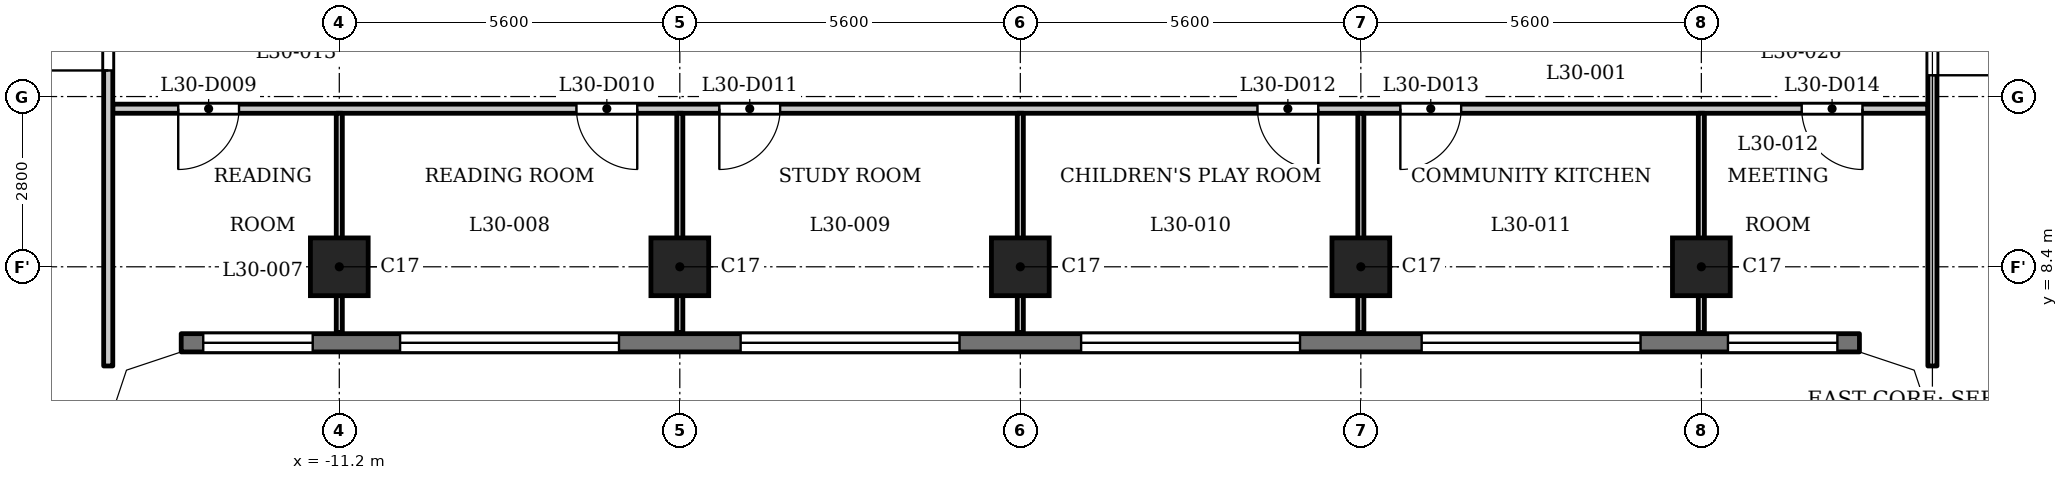
"""IFC4 building model, lengths in metres.
Left out: names, types, materials, properties, quantities, classifications, styles, units other than length and angle.
Written with IfcOpenShell. Run it as: python <this file> out.ifc"""

import sys

from ifc_helpers import new_model, si_unit, direction, frame, frame_2d, origin, origin_2d, place, context, subcontext, project, spatial, polyline, rectangle, outline, extrude, element, fill, save


model = new_model("IFC4")
c1 = context("Model", 3, precision=1e-05, world=origin(), true_north=direction((0.0, 1.0)))
c2 = subcontext(c1, "Body", "Model", "MODEL_VIEW")
j1 = project(units=[si_unit("LENGTHUNIT", "METRE"), si_unit("PLANEANGLEUNIT", "RADIAN")], contexts=[c1])
p1 = place(None, origin())
s1 = spatial("IfcSite", under=j1, at=p1, CompositionType="ELEMENT")
p2 = place(p1, origin())
s2 = spatial("IfcBuilding", under=s1, at=p2, CompositionType="ELEMENT")
p3 = place(p2, frame((0.0, 0.0, 118.3)))
s3 = spatial("IfcBuildingStorey", under=s2, at=p3, CompositionType="ELEMENT", Elevation=118.3)
for number, where, z_axis, x_axis in (
    (1, (-11.2, 8.4, 0.0), (0.0, 0.0, 1.0), (1.0, 0.0, 0.0)),
    (2, (-5.6, 8.4, 0.0), (0.0, 0.0, 1.0), (1.0, 0.0, 0.0)),
    (3, (0.0, 8.4, 0.0), (0.0, 0.0, 1.0), (1.0, 0.0, 0.0)),
    (4, (5.6, 8.4, 0.0), (0.0, 0.0, 1.0), (1.0, 0.0, 0.0)),
    (5, (11.2, 8.4, 0.0), (0.0, 0.0, 1.0), (1.0, 0.0, 0.0)),
):
    element("IfcColumn", number, at=place(p3, frame(where, z_axis=z_axis, x_axis=x_axis)), inside=s3, PredefinedType="COLUMN", context=c2, shape_type="SweptSolid", body=[
        extrude(rectangle(XDim=0.95, YDim=0.95, at=origin_2d()), origin(), (0.0, 0.0, 1.0), 3.5),
    ])
p4 = place(p3, frame((-13.8, 7.15, 0.0), z_axis=(0.0, 0.0, 1.0), x_axis=(1.0, 0.0, 0.0)))
e6 = element("IfcWall", 6, at=p4, inside=s3, PredefinedType="SOLIDWALL", context=c2, shape_type="SweptSolid", body=[
    extrude(rectangle(XDim=27.6, YDim=0.3, at=frame_2d((13.8, 0.0))), origin(), (0.0, 0.0, 1.0), 3.2),
])
p5 = place(p4, frame((0.363, 0.0, 0.9)))
e7 = element("IfcOpeningElement", 7, at=p5, cuts=e6, PredefinedType="OPENING", context=c2, shape_type="SweptSolid", body=[
    extrude(rectangle(XDim=1.8, YDim=1.25, at=frame_2d((0.9, 0.625))), frame((0.0, 0.16, 0.0), z_axis=(0.0, -1.0, 0.0), x_axis=(1.0, 0.0, 0.0)), (0.0, 0.0, 1.0), 0.32),
])
p6 = place(p4, frame((3.6, 0.0, 1.2)))
e8 = element("IfcOpeningElement", 8, at=p6, cuts=e6, PredefinedType="OPENING", context=c2, shape_type="SweptSolid", body=[
    extrude(rectangle(XDim=3.6, YDim=0.95, at=frame_2d((1.8, 0.475))), frame((0.0, 0.16, 0.0), z_axis=(0.0, -1.0, 0.0), x_axis=(1.0, 0.0, 0.0)), (0.0, 0.0, 1.0), 0.32),
])
p7 = place(p4, frame((9.2, 0.0, 1.2)))
e9 = element("IfcOpeningElement", 9, at=p7, cuts=e6, PredefinedType="OPENING", context=c2, shape_type="SweptSolid", body=[
    extrude(rectangle(XDim=3.6, YDim=0.95, at=frame_2d((1.8, 0.475))), frame((0.0, 0.16, 0.0), z_axis=(0.0, -1.0, 0.0), x_axis=(1.0, 0.0, 0.0)), (0.0, 0.0, 1.0), 0.32),
])
p8 = place(p4, frame((14.8, 0.0, 1.2)))
e10 = element("IfcOpeningElement", 10, at=p8, cuts=e6, PredefinedType="OPENING", context=c2, shape_type="SweptSolid", body=[
    extrude(rectangle(XDim=3.6, YDim=0.95, at=frame_2d((1.8, 0.475))), frame((0.0, 0.16, 0.0), z_axis=(0.0, -1.0, 0.0), x_axis=(1.0, 0.0, 0.0)), (0.0, 0.0, 1.0), 0.32),
])
p9 = place(p4, frame((20.4, 0.0, 1.2)))
e11 = element("IfcOpeningElement", 11, at=p9, cuts=e6, PredefinedType="OPENING", context=c2, shape_type="SweptSolid", body=[
    extrude(rectangle(XDim=3.6, YDim=0.95, at=frame_2d((1.8, 0.475))), frame((0.0, 0.16, 0.0), z_axis=(0.0, -1.0, 0.0), x_axis=(1.0, 0.0, 0.0)), (0.0, 0.0, 1.0), 0.32),
])
p10 = place(p4, frame((25.438, 0.0, 0.9)))
e12 = element("IfcOpeningElement", 12, at=p10, cuts=e6, PredefinedType="OPENING", context=c2, shape_type="SweptSolid", body=[
    extrude(rectangle(XDim=1.8, YDim=1.25, at=frame_2d((0.9, 0.625))), frame((0.0, 0.16, 0.0), z_axis=(0.0, -1.0, 0.0), x_axis=(1.0, 0.0, 0.0)), (0.0, 0.0, 1.0), 0.32),
])
p11 = place(p3, frame((-14.925, 11.0, 0.0), z_axis=(0.0, 0.0, 1.0), x_axis=(1.0, 0.0, 0.0)))
e13 = element("IfcWall", 13, at=p11, inside=s3, PredefinedType="PARTITIONING", context=c2, shape_type="SweptSolid", body=[
    extrude(rectangle(XDim=29.85, YDim=0.15, at=frame_2d((14.925, 0.0))), origin(), (0.0, 0.0, 1.0), 3.2),
])
p12 = place(p11, frame((1.076, 0.0, 0.0)))
e14 = element("IfcOpeningElement", 14, at=p12, cuts=e13, PredefinedType="OPENING", context=c2, shape_type="SweptSolid", body=[
    extrude(rectangle(XDim=1.0, YDim=2.1, at=frame_2d((0.5, 1.05))), frame((0.0, 0.085, 0.0), z_axis=(0.0, -1.0, 0.0), x_axis=(1.0, 0.0, 0.0)), (0.0, 0.0, 1.0), 0.17),
])
p13 = place(p11, frame((7.625, 0.0, 0.0)))
e15 = element("IfcOpeningElement", 15, at=p13, cuts=e13, PredefinedType="OPENING", context=c2, shape_type="SweptSolid", body=[
    extrude(rectangle(XDim=1.0, YDim=2.1, at=frame_2d((0.5, 1.05))), frame((0.0, 0.085, 0.0), z_axis=(0.0, -1.0, 0.0), x_axis=(1.0, 0.0, 0.0)), (0.0, 0.0, 1.0), 0.17),
])
p14 = place(p11, frame((9.975, 0.0, 0.0)))
e16 = element("IfcOpeningElement", 16, at=p14, cuts=e13, PredefinedType="OPENING", context=c2, shape_type="SweptSolid", body=[
    extrude(rectangle(XDim=1.0, YDim=2.1, at=frame_2d((0.5, 1.05))), frame((0.0, 0.085, 0.0), z_axis=(0.0, -1.0, 0.0), x_axis=(1.0, 0.0, 0.0)), (0.0, 0.0, 1.0), 0.17),
])
p15 = place(p11, frame((18.825, 0.0, 0.0)))
e17 = element("IfcOpeningElement", 17, at=p15, cuts=e13, PredefinedType="OPENING", context=c2, shape_type="SweptSolid", body=[
    extrude(rectangle(XDim=1.0, YDim=2.1, at=frame_2d((0.5, 1.05))), frame((0.0, 0.085, 0.0), z_axis=(0.0, -1.0, 0.0), x_axis=(1.0, 0.0, 0.0)), (0.0, 0.0, 1.0), 0.17),
])
p16 = place(p11, frame((21.175, 0.0, 0.0)))
e18 = element("IfcOpeningElement", 18, at=p16, cuts=e13, PredefinedType="OPENING", context=c2, shape_type="SweptSolid", body=[
    extrude(rectangle(XDim=1.0, YDim=2.1, at=frame_2d((0.5, 1.05))), frame((0.0, 0.085, 0.0), z_axis=(0.0, -1.0, 0.0), x_axis=(1.0, 0.0, 0.0)), (0.0, 0.0, 1.0), 0.17),
])
p17 = place(p11, frame((27.775, 0.0, 0.0)))
e19 = element("IfcOpeningElement", 19, at=p17, cuts=e13, PredefinedType="OPENING", context=c2, shape_type="SweptSolid", body=[
    extrude(rectangle(XDim=1.0, YDim=2.1, at=frame_2d((0.5, 1.05))), frame((0.0, 0.085, 0.0), z_axis=(0.0, -1.0, 0.0), x_axis=(1.0, 0.0, 0.0)), (0.0, 0.0, 1.0), 0.17),
])
p18 = place(p3, frame((-15.0, 6.769, 0.0), z_axis=(0.0, 0.0, 1.0), x_axis=(0.0, 1.0, 0.0)))
e20 = element("IfcWall", 20, at=p18, inside=s3, PredefinedType="PARTITIONING", context=c2, shape_type="SweptSolid", body=[
    extrude(rectangle(XDim=6.356, YDim=0.15, at=frame_2d((3.178, 0.0))), origin(), (0.0, 0.0, 1.0), 3.2),
])
p19 = place(p18, frame((4.86, 0.0, 0.0)))
e21 = element("IfcOpeningElement", 21, at=p19, cuts=e20, PredefinedType="OPENING", context=c2, shape_type="SweptSolid", body=[
    extrude(rectangle(XDim=1.0, YDim=2.1, at=frame_2d((0.5, 1.05))), frame((0.0, 0.085, 0.0), z_axis=(0.0, -1.0, 0.0), x_axis=(1.0, 0.0, 0.0)), (0.0, 0.0, 1.0), 0.17),
])
for number, where, z_axis, x_axis in (
    (22, (-11.2, 7.32, 0.0), (0.0, 0.0, 1.0), (0.0, 1.0, 0.0)),
    (23, (-5.6, 7.32, 0.0), (0.0, 0.0, 1.0), (0.0, 1.0, 0.0)),
    (24, (0.0, 7.32, 0.0), (0.0, 0.0, 1.0), (0.0, 1.0, 0.0)),
    (25, (5.6, 7.32, 0.0), (0.0, 0.0, 1.0), (0.0, 1.0, 0.0)),
    (26, (11.2, 7.32, 0.0), (0.0, 0.0, 1.0), (0.0, 1.0, 0.0)),
):
    element("IfcWall", number, at=place(p3, frame(where, z_axis=z_axis, x_axis=x_axis)), inside=s3, PredefinedType="PARTITIONING", context=c2, shape_type="SweptSolid", body=[
        extrude(rectangle(XDim=3.605, YDim=0.1, at=frame_2d((1.802, 0.0))), origin(), (0.0, 0.0, 1.0), 3.2),
    ])
p20 = place(p3, frame((15.0, 6.769, 0.0), z_axis=(0.0, 0.0, 1.0), x_axis=(0.0, 1.0, 0.0)))
e27 = element("IfcWall", 27, at=p20, inside=s3, PredefinedType="PARTITIONING", context=c2, shape_type="SweptSolid", body=[
    extrude(rectangle(XDim=6.356, YDim=0.15, at=frame_2d((3.178, 0.0))), origin(), (0.0, 0.0, 1.0), 3.2),
])
p21 = place(p20, frame((4.781, 0.0, 0.0)))
e28 = element("IfcOpeningElement", 28, at=p21, cuts=e27, PredefinedType="OPENING", context=c2, shape_type="SweptSolid", body=[
    extrude(rectangle(XDim=1.0, YDim=2.1, at=frame_2d((0.5, 1.05))), frame((0.0, 0.085, 0.0), z_axis=(0.0, -1.0, 0.0), x_axis=(1.0, 0.0, 0.0)), (0.0, 0.0, 1.0), 0.17),
])
p22 = place(p3, origin())
e29 = element("IfcWall", 29, at=p22, inside=s3, PredefinedType="SOLIDWALL", context=c2, shape_type="SweptSolid", body=[
    extrude(outline(polyline([(-13.849, 7.3), (-14.937, 6.937), (-15.3, 5.849), (-15.3, 5.8), (-15.0, 5.8), (-14.7, 6.7), (-13.8, 7.0), (-13.8, 7.3), (-13.849, 7.3)])), origin(), (0.0, 0.0, 1.0), 3.2),
])
e30 = element("IfcWall", 30, at=p22, inside=s3, PredefinedType="SOLIDWALL", context=c2, shape_type="SweptSolid", body=[
    extrude(outline(polyline([(14.937, 6.937), (13.849, 7.3), (13.8, 7.3), (13.8, 7.0), (14.7, 6.7), (15.0, 5.8), (15.3, 5.8), (15.3, 5.849), (14.937, 6.937)])), origin(), (0.0, 0.0, 1.0), 3.2),
])
p23 = place(p19, origin())
e31 = element("IfcDoor", 31, at=p23, inside=s3, OperationType="SINGLE_SWING_RIGHT", PredefinedType="DOOR", context=c2, shape_type="SweptSolid", body=[
    extrude(rectangle(XDim=1.0, YDim=2.1, at=frame_2d((0.5, 1.05))), frame((0.0, 0.025, 0.0), z_axis=(0.0, -1.0, 0.0), x_axis=(1.0, 0.0, 0.0)), (0.0, 0.0, 1.0), 0.05),
])
fill(e21, e31)
p24 = place(p21, origin())
e32 = element("IfcDoor", 32, at=p24, inside=s3, OperationType="SINGLE_SWING_LEFT", PredefinedType="DOOR", context=c2, shape_type="SweptSolid", body=[
    extrude(rectangle(XDim=1.0, YDim=2.1, at=frame_2d((0.5, 1.05))), frame((0.0, 0.025, 0.0), z_axis=(0.0, -1.0, 0.0), x_axis=(1.0, 0.0, 0.0)), (0.0, 0.0, 1.0), 0.05),
])
fill(e28, e32)
p25 = place(p12, origin())
e33 = element("IfcDoor", 33, at=p25, inside=s3, OperationType="SINGLE_SWING_LEFT", PredefinedType="DOOR", context=c2, shape_type="SweptSolid", body=[
    extrude(rectangle(XDim=1.0, YDim=2.1, at=frame_2d((0.5, 1.05))), frame((0.0, 0.025, 0.0), z_axis=(0.0, -1.0, 0.0), x_axis=(1.0, 0.0, 0.0)), (0.0, 0.0, 1.0), 0.05),
])
fill(e14, e33)
p26 = place(p13, origin())
e34 = element("IfcDoor", 34, at=p26, inside=s3, OperationType="SINGLE_SWING_RIGHT", PredefinedType="DOOR", context=c2, shape_type="SweptSolid", body=[
    extrude(rectangle(XDim=1.0, YDim=2.1, at=frame_2d((0.5, 1.05))), frame((0.0, 0.025, 0.0), z_axis=(0.0, -1.0, 0.0), x_axis=(1.0, 0.0, 0.0)), (0.0, 0.0, 1.0), 0.05),
])
fill(e15, e34)
p27 = place(p14, origin())
e35 = element("IfcDoor", 35, at=p27, inside=s3, OperationType="SINGLE_SWING_LEFT", PredefinedType="DOOR", context=c2, shape_type="SweptSolid", body=[
    extrude(rectangle(XDim=1.0, YDim=2.1, at=frame_2d((0.5, 1.05))), frame((0.0, 0.025, 0.0), z_axis=(0.0, -1.0, 0.0), x_axis=(1.0, 0.0, 0.0)), (0.0, 0.0, 1.0), 0.05),
])
fill(e16, e35)
p28 = place(p15, origin())
e36 = element("IfcDoor", 36, at=p28, inside=s3, OperationType="SINGLE_SWING_RIGHT", PredefinedType="DOOR", context=c2, shape_type="SweptSolid", body=[
    extrude(rectangle(XDim=1.0, YDim=2.1, at=frame_2d((0.5, 1.05))), frame((0.0, 0.025, 0.0), z_axis=(0.0, -1.0, 0.0), x_axis=(1.0, 0.0, 0.0)), (0.0, 0.0, 1.0), 0.05),
])
fill(e17, e36)
p29 = place(p16, origin())
e37 = element("IfcDoor", 37, at=p29, inside=s3, OperationType="SINGLE_SWING_LEFT", PredefinedType="DOOR", context=c2, shape_type="SweptSolid", body=[
    extrude(rectangle(XDim=1.0, YDim=2.1, at=frame_2d((0.5, 1.05))), frame((0.0, 0.025, 0.0), z_axis=(0.0, -1.0, 0.0), x_axis=(1.0, 0.0, 0.0)), (0.0, 0.0, 1.0), 0.05),
])
fill(e18, e37)
p30 = place(p17, origin())
e38 = element("IfcDoor", 38, at=p30, inside=s3, OperationType="SINGLE_SWING_RIGHT", PredefinedType="DOOR", context=c2, shape_type="SweptSolid", body=[
    extrude(rectangle(XDim=1.0, YDim=2.1, at=frame_2d((0.5, 1.05))), frame((0.0, 0.025, 0.0), z_axis=(0.0, -1.0, 0.0), x_axis=(1.0, 0.0, 0.0)), (0.0, 0.0, 1.0), 0.05),
])
fill(e19, e38)
p31 = place(p5, origin())
e39 = element("IfcWindow", 39, at=p31, inside=s3, PartitioningType="SINGLE_PANEL", PredefinedType="WINDOW", context=c2, shape_type="SweptSolid", body=[
    extrude(rectangle(XDim=1.8, YDim=1.25, at=frame_2d((0.9, 0.625))), frame((0.0, 0.03, 0.0), z_axis=(0.0, -1.0, 0.0), x_axis=(1.0, 0.0, 0.0)), (0.0, 0.0, 1.0), 0.06),
])
fill(e7, e39)
p32 = place(p6, origin())
e40 = element("IfcWindow", 40, at=p32, inside=s3, PartitioningType="SINGLE_PANEL", PredefinedType="WINDOW", context=c2, shape_type="SweptSolid", body=[
    extrude(rectangle(XDim=3.6, YDim=0.95, at=frame_2d((1.8, 0.475))), frame((0.0, 0.03, 0.0), z_axis=(0.0, -1.0, 0.0), x_axis=(1.0, 0.0, 0.0)), (0.0, 0.0, 1.0), 0.06),
])
fill(e8, e40)
p33 = place(p7, origin())
e41 = element("IfcWindow", 41, at=p33, inside=s3, PartitioningType="SINGLE_PANEL", PredefinedType="WINDOW", context=c2, shape_type="SweptSolid", body=[
    extrude(rectangle(XDim=3.6, YDim=0.95, at=frame_2d((1.8, 0.475))), frame((0.0, 0.03, 0.0), z_axis=(0.0, -1.0, 0.0), x_axis=(1.0, 0.0, 0.0)), (0.0, 0.0, 1.0), 0.06),
])
fill(e9, e41)
p34 = place(p8, origin())
e42 = element("IfcWindow", 42, at=p34, inside=s3, PartitioningType="SINGLE_PANEL", PredefinedType="WINDOW", context=c2, shape_type="SweptSolid", body=[
    extrude(rectangle(XDim=3.6, YDim=0.95, at=frame_2d((1.8, 0.475))), frame((0.0, 0.03, 0.0), z_axis=(0.0, -1.0, 0.0), x_axis=(1.0, 0.0, 0.0)), (0.0, 0.0, 1.0), 0.06),
])
fill(e10, e42)
p35 = place(p9, origin())
e43 = element("IfcWindow", 43, at=p35, inside=s3, PartitioningType="SINGLE_PANEL", PredefinedType="WINDOW", context=c2, shape_type="SweptSolid", body=[
    extrude(rectangle(XDim=3.6, YDim=0.95, at=frame_2d((1.8, 0.475))), frame((0.0, 0.03, 0.0), z_axis=(0.0, -1.0, 0.0), x_axis=(1.0, 0.0, 0.0)), (0.0, 0.0, 1.0), 0.06),
])
fill(e11, e43)
p36 = place(p10, origin())
e44 = element("IfcWindow", 44, at=p36, inside=s3, PartitioningType="SINGLE_PANEL", PredefinedType="WINDOW", context=c2, shape_type="SweptSolid", body=[
    extrude(rectangle(XDim=1.8, YDim=1.25, at=frame_2d((0.9, 0.625))), frame((0.0, 0.03, 0.0), z_axis=(0.0, -1.0, 0.0), x_axis=(1.0, 0.0, 0.0)), (0.0, 0.0, 1.0), 0.06),
])
fill(e12, e44)
save(model, sys.argv[1])
